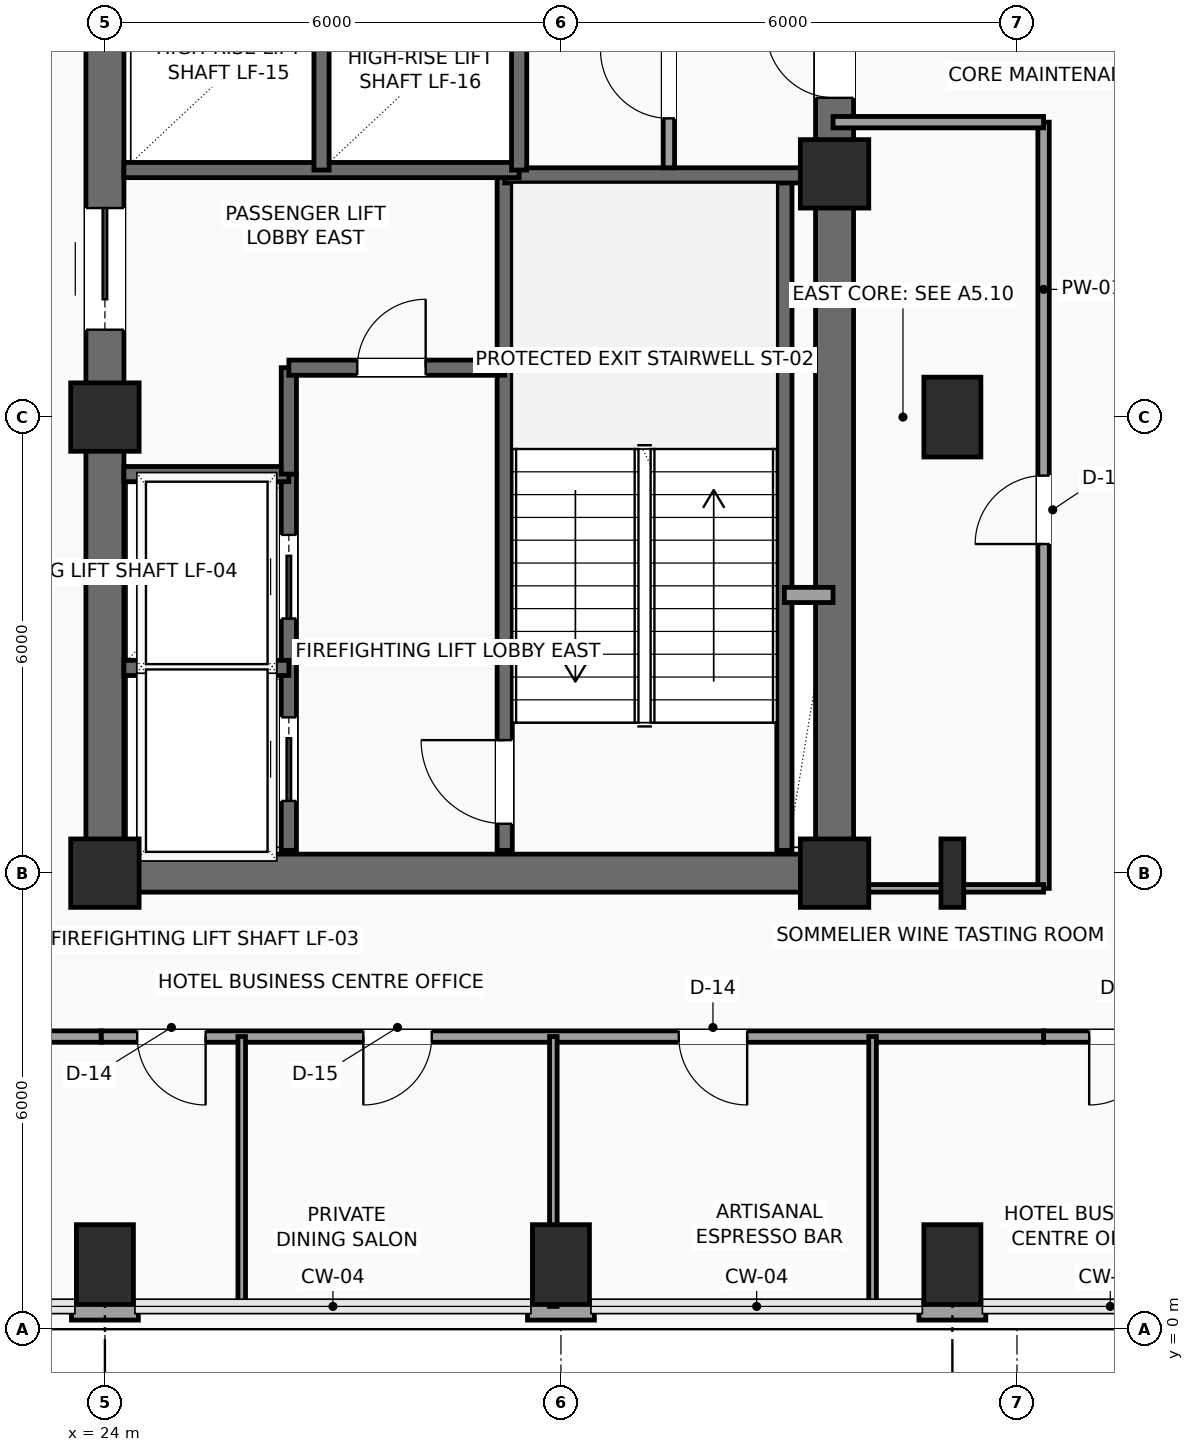
"""IFC4 building model, lengths in metres.
Left out: names, types, materials, properties, quantities, classifications, styles, units other than length and angle.
Written with IfcOpenShell. Run it as: python <this file> out.ifc"""

import sys

from ifc_helpers import new_model, si_unit, direction, frame, frame_2d, origin, origin_2d, place, context, subcontext, project, spatial, rectangle, i_section, extrude, element, fill, save


model = new_model("IFC4")
c1 = context("Model", 3, precision=1e-05, world=origin(), true_north=direction((0.0, 1.0)))
c2 = subcontext(c1, "Body", "Model", "MODEL_VIEW")
j1 = project(units=[si_unit("LENGTHUNIT", "METRE"), si_unit("PLANEANGLEUNIT", "RADIAN")], contexts=[c1])
p1 = place(None, origin())
s1 = spatial("IfcSite", under=j1, at=p1, CompositionType="ELEMENT")
p2 = place(p1, origin())
s2 = spatial("IfcBuilding", under=s1, at=p2, CompositionType="ELEMENT")
p3 = place(p2, frame((0.0, 0.0, 191.7)))
s3 = spatial("IfcBuildingStorey", under=s2, at=p3, CompositionType="ELEMENT", Elevation=191.7)
for number, where, z_axis, x_axis in (
    (1, (24.0, 6.0, 0.0), (0.0, 0.0, 1.0), (1.0, 0.0, 0.0)),
    (2, (24.0, 12.0, 0.0), (0.0, 0.0, 1.0), (1.0, 0.0, 0.0)),
    (3, (33.6, 6.0, 0.0), (0.0, 0.0, 1.0), (1.0, 0.0, 0.0)),
    (4, (33.6, 15.2, 0.0), (0.0, 0.0, 1.0), (1.0, 0.0, 0.0)),
):
    element("IfcColumn", number, at=place(p3, frame(where, z_axis=z_axis, x_axis=x_axis)), inside=s3, PredefinedType="COLUMN", context=c2, shape_type="SweptSolid", body=[
        extrude(rectangle(XDim=0.9, YDim=0.9, at=origin_2d()), origin(), (0.0, 0.0, 1.0), 3.75),
    ])
for number, where, z_axis, x_axis in (
    (5, (24.0, 0.85, 0.0), (0.0, 0.0, 1.0), (1.0, 0.0, 0.0)),
    (6, (30.0, 0.85, 0.0), (0.0, 0.0, 1.0), (1.0, 0.0, 0.0)),
    (7, (35.15, 0.85, 0.0), (0.0, 0.0, 1.0), (1.0, 0.0, 0.0)),
):
    element("IfcColumn", number, at=place(p3, frame(where, z_axis=z_axis, x_axis=x_axis)), inside=s3, PredefinedType="COLUMN", context=c2, shape_type="SweptSolid", body=[
        extrude(rectangle(XDim=0.75, YDim=1.05, at=origin_2d()), origin(), (0.0, 0.0, 1.0), 3.75),
    ])
p4 = place(p3, frame((35.15, 6.0, 0.0), z_axis=(0.0, 0.0, 1.0), x_axis=(1.0, 0.0, 0.0)))
e8 = element("IfcColumn", 8, at=p4, inside=s3, PredefinedType="COLUMN", context=c2, shape_type="SweptSolid", body=[
    extrude(i_section(OverallWidth=0.3, OverallDepth=0.9, WebThickness=0.019, FlangeThickness=0.035, FilletRadius=0.03, at=origin_2d()), origin(), (0.0, 0.0, 1.0), 3.75),
])
p5 = place(p3, frame((35.15, 12.0, 0.0), z_axis=(0.0, 0.0, 1.0), x_axis=(1.0, 0.0, 0.0)))
e9 = element("IfcColumn", 9, at=p5, inside=s3, PredefinedType="COLUMN", context=c2, shape_type="SweptSolid", body=[
    extrude(rectangle(XDim=0.75, YDim=1.05, at=origin_2d()), origin(), (0.0, 0.0, 1.0), 3.75),
])
p6 = place(p3, frame((35.59, 0.24, 0.0), z_axis=(0.0, 0.0, 1.0), x_axis=(-1.0, 0.0, 0.0)))
e10 = element("IfcWall", 10, at=p6, inside=s3, PredefinedType="SOLIDWALL", context=c2, shape_type="SweptSolid", body=[
    extrude(rectangle(XDim=0.88, YDim=0.24, at=frame_2d((0.44, 0.0))), origin(), (0.0, 0.0, 1.0), 3.54),
])
for number, where, z_axis, x_axis in (
    (11, (30.44, 0.24, 0.0), (0.0, 0.0, 1.0), (-1.0, 0.0, 0.0)),
    (12, (24.44, 0.24, 0.0), (0.0, 0.0, 1.0), (-1.0, 0.0, 0.0)),
):
    element("IfcWall", number, at=place(p3, frame(where, z_axis=z_axis, x_axis=x_axis)), inside=s3, PredefinedType="SOLIDWALL", context=c2, shape_type="SweptSolid", body=[
        extrude(rectangle(XDim=0.88, YDim=0.24, at=frame_2d((0.44, 0.0))), origin(), (0.0, 0.0, 1.0), 3.54),
    ])
p7 = place(p3, frame((24.0, 6.0, 0.0), z_axis=(0.0, 0.0, 1.0), x_axis=(1.0, 0.0, 0.0)))
e13 = element("IfcWall", 13, at=p7, inside=s3, PredefinedType="SHEAR", context=c2, shape_type="SweptSolid", body=[
    extrude(rectangle(XDim=9.6, YDim=0.5, at=frame_2d((4.8, 0.0))), origin(), (0.0, 0.0, 1.0), 3.54),
])
p8 = place(p3, frame((24.0, 6.0, 0.0), z_axis=(0.0, 0.0, 1.0), x_axis=(0.0, 1.0, 0.0)))
e14 = element("IfcWall", 14, at=p8, inside=s3, PredefinedType="SHEAR", context=c2, shape_type="SweptSolid", body=[
    extrude(rectangle(XDim=12.0, YDim=0.5, at=frame_2d((6.0, 0.0))), origin(), (0.0, 0.0, 1.0), 3.54),
])
p9 = place(p8, frame((7.15, 0.0, 0.0)))
e15 = element("IfcOpeningElement", 15, at=p9, cuts=e14, PredefinedType="OPENING", context=c2, shape_type="SweptSolid", body=[
    extrude(rectangle(XDim=1.6, YDim=2.3, at=frame_2d((0.8, 1.15))), frame((0.0, 0.26, 0.0), z_axis=(0.0, -1.0, 0.0), x_axis=(1.0, 0.0, 0.0)), (0.0, 0.0, 1.0), 0.52),
])
p10 = place(p3, frame((33.6, 6.0, 0.0), z_axis=(0.0, 0.0, 1.0), x_axis=(0.0, 1.0, 0.0)))
e16 = element("IfcWall", 16, at=p10, inside=s3, PredefinedType="SHEAR", context=c2, shape_type="SweptSolid", body=[
    extrude(rectangle(XDim=12.0, YDim=0.5, at=frame_2d((6.0, 0.0))), origin(), (0.0, 0.0, 1.0), 3.54),
])
p11 = place(p10, frame((10.2, 0.0, 0.0)))
e17 = element("IfcOpeningElement", 17, at=p11, cuts=e16, PredefinedType="OPENING", context=c2, shape_type="SweptSolid", body=[
    extrude(rectangle(XDim=0.9, YDim=2.15, at=frame_2d((0.45, 1.075))), frame((0.0, 0.26, 0.0), z_axis=(0.0, -1.0, 0.0), x_axis=(1.0, 0.0, 0.0)), (0.0, 0.0, 1.0), 0.52),
])
p12 = place(p3, frame((29.26, 6.3, 0.0), z_axis=(0.0, 0.0, 1.0), x_axis=(0.0, 1.0, 0.0)))
e18 = element("IfcWall", 18, at=p12, inside=s3, PredefinedType="SHEAR", context=c2, shape_type="SweptSolid", body=[
    extrude(rectangle(XDim=8.88, YDim=0.2, at=frame_2d((4.44, 0.0))), origin(), (0.0, 0.0, 1.0), 3.54),
])
p13 = place(p12, frame((0.35, 0.0, 0.0)))
e19 = element("IfcOpeningElement", 19, at=p13, cuts=e18, PredefinedType="OPENING", context=c2, shape_type="SweptSolid", body=[
    extrude(rectangle(XDim=1.1, YDim=2.2, at=frame_2d((0.55, 1.1))), frame((0.0, 0.11, 0.0), z_axis=(0.0, -1.0, 0.0), x_axis=(1.0, 0.0, 0.0)), (0.0, 0.0, 1.0), 0.22),
])
p14 = place(p3, frame((32.94, 6.3, 0.0), z_axis=(0.0, 0.0, 1.0), x_axis=(0.0, 1.0, 0.0)))
e20 = element("IfcWall", 20, at=p14, inside=s3, PredefinedType="SHEAR", context=c2, shape_type="SweptSolid", body=[
    extrude(rectangle(XDim=8.88, YDim=0.2, at=frame_2d((4.44, 0.0))), origin(), (0.0, 0.0, 1.0), 3.54),
])
p15 = place(p3, frame((29.26, 15.18, 0.0), z_axis=(0.0, 0.0, 1.0), x_axis=(1.0, 0.0, 0.0)))
e21 = element("IfcWall", 21, at=p15, inside=s3, PredefinedType="SHEAR", context=c2, shape_type="SweptSolid", body=[
    extrude(rectangle(XDim=4.04, YDim=0.2, at=frame_2d((2.02, 0.0))), origin(), (0.0, 0.0, 1.0), 3.54),
])
p16 = place(p3, frame((26.42, 6.3, 0.0), z_axis=(0.0, 0.0, 1.0), x_axis=(0.0, 1.0, 0.0)))
e22 = element("IfcWall", 22, at=p16, inside=s3, PredefinedType="SHEAR", context=c2, shape_type="SweptSolid", body=[
    extrude(rectangle(XDim=4.95, YDim=0.2, at=frame_2d((2.475, 0.0))), origin(), (0.0, 0.0, 1.0), 3.54),
])
p17 = place(p16, frame((0.65, 0.0, 0.0)))
e23 = element("IfcOpeningElement", 23, at=p17, cuts=e22, PredefinedType="OPENING", context=c2, shape_type="SweptSolid", body=[
    extrude(rectangle(XDim=1.1, YDim=2.2, at=frame_2d((0.55, 1.1))), frame((0.0, 0.11, 0.0), z_axis=(0.0, -1.0, 0.0), x_axis=(1.0, 0.0, 0.0)), (0.0, 0.0, 1.0), 0.22),
])
p18 = place(p16, frame((3.05, 0.0, 0.0)))
e24 = element("IfcOpeningElement", 24, at=p18, cuts=e22, PredefinedType="OPENING", context=c2, shape_type="SweptSolid", body=[
    extrude(rectangle(XDim=1.1, YDim=2.2, at=frame_2d((0.55, 1.1))), frame((0.0, 0.11, 0.0), z_axis=(0.0, -1.0, 0.0), x_axis=(1.0, 0.0, 0.0)), (0.0, 0.0, 1.0), 0.22),
])
for number, where, z_axis, x_axis in (
    (25, (24.25, 8.7, 0.0), (0.0, 0.0, 1.0), (1.0, 0.0, 0.0)),
    (26, (24.25, 11.25, 0.0), (0.0, 0.0, 1.0), (1.0, 0.0, 0.0)),
):
    element("IfcWall", number, at=place(p3, frame(where, z_axis=z_axis, x_axis=x_axis)), inside=s3, PredefinedType="SHEAR", context=c2, shape_type="SweptSolid", body=[
        extrude(rectangle(XDim=2.17, YDim=0.2, at=frame_2d((1.085, 0.0))), origin(), (0.0, 0.0, 1.0), 3.54),
    ])
p19 = place(p3, frame((26.42, 11.25, 0.0), z_axis=(0.0, 0.0, 1.0), x_axis=(0.0, 1.0, 0.0)))
e27 = element("IfcWall", 27, at=p19, inside=s3, PredefinedType="SHEAR", context=c2, shape_type="SweptSolid", body=[
    extrude(rectangle(XDim=1.4, YDim=0.2, at=frame_2d((0.7, 0.0))), origin(), (0.0, 0.0, 1.0), 3.54),
])
p20 = place(p3, frame((26.42, 12.65, 0.0), z_axis=(0.0, 0.0, 1.0), x_axis=(1.0, 0.0, 0.0)))
e28 = element("IfcWall", 28, at=p20, inside=s3, PredefinedType="SHEAR", context=c2, shape_type="SweptSolid", body=[
    extrude(rectangle(XDim=2.84, YDim=0.2, at=frame_2d((1.42, 0.0))), origin(), (0.0, 0.0, 1.0), 3.54),
])
p21 = place(p20, frame((0.9, 0.0, 0.0)))
e29 = element("IfcOpeningElement", 29, at=p21, cuts=e28, PredefinedType="OPENING", context=c2, shape_type="SweptSolid", body=[
    extrude(rectangle(XDim=0.9, YDim=2.15, at=frame_2d((0.45, 1.075))), frame((0.0, 0.11, 0.0), z_axis=(0.0, -1.0, 0.0), x_axis=(1.0, 0.0, 0.0)), (0.0, 0.0, 1.0), 0.22),
])
p22 = place(p3, frame((32.94, 9.66, 0.0), z_axis=(0.0, 0.0, 1.0), x_axis=(1.0, 0.0, 0.0)))
e30 = element("IfcWall", 30, at=p22, inside=s3, PredefinedType="SOLIDWALL", context=c2, shape_type="SweptSolid", body=[
    extrude(rectangle(XDim=0.64, YDim=0.2, at=frame_2d((0.32, 0.0))), origin(), (0.0, 0.0, 1.0), 3.54),
])
p23 = place(p3, frame((24.25, 15.25, 0.0), z_axis=(0.0, 0.0, 1.0), x_axis=(1.0, 0.0, 0.0)))
e31 = element("IfcWall", 31, at=p23, inside=s3, PredefinedType="SHEAR", context=c2, shape_type="SweptSolid", body=[
    extrude(rectangle(XDim=5.2, YDim=0.2, at=frame_2d((2.6, 0.0))), origin(), (0.0, 0.0, 1.0), 3.54),
])
p24 = place(p3, frame((26.85, 15.25, 0.0), z_axis=(0.0, 0.0, 1.0), x_axis=(0.0, 1.0, 0.0)))
e32 = element("IfcWall", 32, at=p24, inside=s3, PredefinedType="SHEAR", context=c2, shape_type="SweptSolid", body=[
    extrude(rectangle(XDim=2.4, YDim=0.2, at=frame_2d((1.2, 0.0))), origin(), (0.0, 0.0, 1.0), 3.54),
])
p25 = place(p3, frame((29.45, 15.25, 0.0), z_axis=(0.0, 0.0, 1.0), x_axis=(0.0, 1.0, 0.0)))
e33 = element("IfcWall", 33, at=p25, inside=s3, PredefinedType="SHEAR", context=c2, shape_type="SweptSolid", body=[
    extrude(rectangle(XDim=2.45, YDim=0.2, at=frame_2d((1.225, 0.0))), origin(), (0.0, 0.0, 1.0), 3.54),
])
p26 = place(p3, frame((31.42, 15.28, 0.0), z_axis=(0.0, 0.0, 1.0), x_axis=(0.0, 1.0, 0.0)))
e34 = element("IfcWall", 34, at=p26, inside=s3, PredefinedType="PARTITIONING", context=c2, shape_type="SweptSolid", body=[
    extrude(rectangle(XDim=2.42, YDim=0.15, at=frame_2d((1.21, 0.0))), origin(), (0.0, 0.0, 1.0), 3.54),
])
p27 = place(p26, frame((0.65, 0.0, 0.0)))
e35 = element("IfcOpeningElement", 35, at=p27, cuts=e34, PredefinedType="OPENING", context=c2, shape_type="SweptSolid", body=[
    extrude(rectangle(XDim=0.9, YDim=2.15, at=frame_2d((0.45, 1.075))), frame((0.0, 0.085, 0.0), z_axis=(0.0, -1.0, 0.0), x_axis=(1.0, 0.0, 0.0)), (0.0, 0.0, 1.0), 0.17),
])
p28 = place(p3, frame((36.35, 5.8, 0.0), z_axis=(0.0, 0.0, 1.0), x_axis=(0.0, 1.0, 0.0)))
e36 = element("IfcWall", 36, at=p28, inside=s3, PredefinedType="PARTITIONING", context=c2, shape_type="SweptSolid", body=[
    extrude(rectangle(XDim=10.08, YDim=0.15, at=frame_2d((5.04, 0.0))), origin(), (0.0, 0.0, 1.0), 3.54),
])
p29 = place(p28, frame((4.53, 0.0, 0.0)))
e37 = element("IfcOpeningElement", 37, at=p29, cuts=e36, PredefinedType="OPENING", context=c2, shape_type="SweptSolid", body=[
    extrude(rectangle(XDim=0.9, YDim=2.1, at=frame_2d((0.45, 1.05))), frame((0.0, 0.085, 0.0), z_axis=(0.0, -1.0, 0.0), x_axis=(1.0, 0.0, 0.0)), (0.0, 0.0, 1.0), 0.17),
])
p30 = place(p3, frame((36.35, 15.88, 0.0), z_axis=(0.0, 0.0, 1.0), x_axis=(-1.0, 0.0, 0.0)))
e38 = element("IfcWall", 38, at=p30, inside=s3, PredefinedType="PARTITIONING", context=c2, shape_type="SweptSolid", body=[
    extrude(rectangle(XDim=2.77, YDim=0.15, at=frame_2d((1.385, 0.0))), origin(), (0.0, 0.0, 1.0), 3.54),
])
p31 = place(p3, frame((38.45, 3.85, 0.0), z_axis=(0.0, 0.0, 1.0), x_axis=(-1.0, 0.0, 0.0)))
e39 = element("IfcWall", 39, at=p31, inside=s3, PredefinedType="PARTITIONING", context=c2, shape_type="SweptSolid", body=[
    extrude(rectangle(XDim=2.1, YDim=0.15, at=frame_2d((1.05, 0.0))), origin(), (0.0, 0.0, 1.0), 3.54),
])
p32 = place(p31, frame((0.6, 0.0, 0.0)))
e40 = element("IfcOpeningElement", 40, at=p32, cuts=e39, PredefinedType="OPENING", context=c2, shape_type="SweptSolid", body=[
    extrude(rectangle(XDim=0.9, YDim=2.1, at=frame_2d((0.45, 1.05))), frame((0.0, 0.085, 0.0), z_axis=(0.0, -1.0, 0.0), x_axis=(1.0, 0.0, 0.0)), (0.0, 0.0, 1.0), 0.17),
])
p33 = place(p3, frame((36.35, 3.85, 0.0), z_axis=(0.0, 0.0, 1.0), x_axis=(-1.0, 0.0, 0.0)))
e41 = element("IfcWall", 41, at=p33, inside=s3, PredefinedType="PARTITIONING", context=c2, shape_type="SweptSolid", body=[
    extrude(rectangle(XDim=12.4, YDim=0.15, at=frame_2d((6.2, 0.0))), origin(), (0.0, 0.0, 1.0), 3.54),
])
p34 = place(p33, frame((11.025, 0.0, 0.0)))
e42 = element("IfcOpeningElement", 42, at=p34, cuts=e41, PredefinedType="OPENING", context=c2, shape_type="SweptSolid", body=[
    extrude(rectangle(XDim=0.9, YDim=2.1, at=frame_2d((0.45, 1.05))), frame((0.0, 0.085, 0.0), z_axis=(0.0, -1.0, 0.0), x_axis=(1.0, 0.0, 0.0)), (0.0, 0.0, 1.0), 0.17),
])
p35 = place(p33, frame((8.05, 0.0, 0.0)))
e43 = element("IfcOpeningElement", 43, at=p35, cuts=e41, PredefinedType="OPENING", context=c2, shape_type="SweptSolid", body=[
    extrude(rectangle(XDim=0.9, YDim=2.1, at=frame_2d((0.45, 1.05))), frame((0.0, 0.085, 0.0), z_axis=(0.0, -1.0, 0.0), x_axis=(1.0, 0.0, 0.0)), (0.0, 0.0, 1.0), 0.17),
])
p36 = place(p33, frame((3.9, 0.0, 0.0)))
e44 = element("IfcOpeningElement", 44, at=p36, cuts=e41, PredefinedType="OPENING", context=c2, shape_type="SweptSolid", body=[
    extrude(rectangle(XDim=0.9, YDim=2.1, at=frame_2d((0.45, 1.05))), frame((0.0, 0.085, 0.0), z_axis=(0.0, -1.0, 0.0), x_axis=(1.0, 0.0, 0.0)), (0.0, 0.0, 1.0), 0.17),
])
p37 = place(p3, frame((23.95, 3.85, 0.0), z_axis=(0.0, 0.0, 1.0), x_axis=(-1.0, 0.0, 0.0)))
e45 = element("IfcWall", 45, at=p37, inside=s3, PredefinedType="PARTITIONING", context=c2, shape_type="SweptSolid", body=[
    extrude(rectangle(XDim=2.0, YDim=0.15, at=frame_2d((1.0, 0.0))), origin(), (0.0, 0.0, 1.0), 3.54),
])
for number, where, z_axis, x_axis in (
    (46, (25.8, 0.3, 0.0), (0.0, 0.0, 1.0), (0.0, 1.0, 0.0)),
    (47, (29.9, 0.3, 0.0), (0.0, 0.0, 1.0), (0.0, 1.0, 0.0)),
    (48, (34.1, 0.3, 0.0), (0.0, 0.0, 1.0), (0.0, 1.0, 0.0)),
):
    element("IfcWall", number, at=place(p3, frame(where, z_axis=z_axis, x_axis=x_axis)), inside=s3, PredefinedType="PARTITIONING", context=c2, shape_type="SweptSolid", body=[
        extrude(rectangle(XDim=3.55, YDim=0.1, at=frame_2d((1.775, 0.0))), origin(), (0.0, 0.0, 1.0), 3.54),
    ])
p38 = place(p3, frame((33.65, 5.8, 0.0), z_axis=(0.0, 0.0, 1.0), x_axis=(1.0, 0.0, 0.0)))
e49 = element("IfcWall", 49, at=p38, inside=s3, PredefinedType="PARTITIONING", context=c2, shape_type="SweptSolid", body=[
    extrude(rectangle(XDim=2.7, YDim=0.1, at=frame_2d((1.35, 0.0))), origin(), (0.0, 0.0, 1.0), 3.132),
])
p39 = place(p9, origin())
e50 = element("IfcDoor", 50, at=p39, inside=s3, OperationType="DOUBLE_DOOR_SLIDING", PredefinedType="DOOR", context=c2, shape_type="SweptSolid", body=[
    extrude(rectangle(XDim=1.6, YDim=2.3, at=frame_2d((0.8, 1.15))), frame((0.0, 0.025, 0.0), z_axis=(0.0, -1.0, 0.0), x_axis=(1.0, 0.0, 0.0)), (0.0, 0.0, 1.0), 0.05),
])
fill(e15, e50)
p40 = place(p11, origin())
e51 = element("IfcDoor", 51, at=p40, inside=s3, OperationType="SINGLE_SWING_RIGHT", PredefinedType="DOOR", context=c2, shape_type="SweptSolid", body=[
    extrude(rectangle(XDim=0.9, YDim=2.15, at=frame_2d((0.45, 1.075))), frame((0.0, 0.025, 0.0), z_axis=(0.0, -1.0, 0.0), x_axis=(1.0, 0.0, 0.0)), (0.0, 0.0, 1.0), 0.05),
])
fill(e17, e51)
p41 = place(p13, origin())
e52 = element("IfcDoor", 52, at=p41, inside=s3, OperationType="SINGLE_SWING_RIGHT", PredefinedType="DOOR", context=c2, shape_type="SweptSolid", body=[
    extrude(rectangle(XDim=1.1, YDim=2.2, at=frame_2d((0.55, 1.1))), frame((0.0, 0.025, 0.0), z_axis=(0.0, -1.0, 0.0), x_axis=(1.0, 0.0, 0.0)), (0.0, 0.0, 1.0), 0.05),
])
fill(e19, e52)
p42 = place(p17, origin())
e53 = element("IfcDoor", 53, at=p42, inside=s3, OperationType="SLIDING_TO_LEFT", PredefinedType="DOOR", context=c2, shape_type="SweptSolid", body=[
    extrude(rectangle(XDim=1.1, YDim=2.2, at=frame_2d((0.55, 1.1))), frame((0.0, 0.025, 0.0), z_axis=(0.0, -1.0, 0.0), x_axis=(1.0, 0.0, 0.0)), (0.0, 0.0, 1.0), 0.05),
])
fill(e23, e53)
p43 = place(p18, origin())
e54 = element("IfcDoor", 54, at=p43, inside=s3, OperationType="SLIDING_TO_LEFT", PredefinedType="DOOR", context=c2, shape_type="SweptSolid", body=[
    extrude(rectangle(XDim=1.1, YDim=2.2, at=frame_2d((0.55, 1.1))), frame((0.0, 0.025, 0.0), z_axis=(0.0, -1.0, 0.0), x_axis=(1.0, 0.0, 0.0)), (0.0, 0.0, 1.0), 0.05),
])
fill(e24, e54)
p44 = place(p21, origin())
e55 = element("IfcDoor", 55, at=p44, inside=s3, OperationType="SINGLE_SWING_RIGHT", PredefinedType="DOOR", context=c2, shape_type="SweptSolid", body=[
    extrude(rectangle(XDim=0.9, YDim=2.15, at=frame_2d((0.45, 1.075))), frame((0.0, 0.025, 0.0), z_axis=(0.0, -1.0, 0.0), x_axis=(1.0, 0.0, 0.0)), (0.0, 0.0, 1.0), 0.05),
])
fill(e29, e55)
p45 = place(p27, origin())
e56 = element("IfcDoor", 56, at=p45, inside=s3, OperationType="SINGLE_SWING_RIGHT", PredefinedType="DOOR", context=c2, shape_type="SweptSolid", body=[
    extrude(rectangle(XDim=0.9, YDim=2.15, at=frame_2d((0.45, 1.075))), frame((0.0, 0.025, 0.0), z_axis=(0.0, -1.0, 0.0), x_axis=(1.0, 0.0, 0.0)), (0.0, 0.0, 1.0), 0.05),
])
fill(e35, e56)
p46 = place(p29, origin())
e57 = element("IfcDoor", 57, at=p46, inside=s3, OperationType="SINGLE_SWING_LEFT", PredefinedType="DOOR", context=c2, shape_type="SweptSolid", body=[
    extrude(rectangle(XDim=0.9, YDim=2.1, at=frame_2d((0.45, 1.05))), frame((0.0, 0.025, 0.0), z_axis=(0.0, -1.0, 0.0), x_axis=(1.0, 0.0, 0.0)), (0.0, 0.0, 1.0), 0.05),
])
fill(e37, e57)
p47 = place(p32, origin())
e58 = element("IfcDoor", 58, at=p47, inside=s3, OperationType="SINGLE_SWING_RIGHT", PredefinedType="DOOR", context=c2, shape_type="SweptSolid", body=[
    extrude(rectangle(XDim=0.9, YDim=2.1, at=frame_2d((0.45, 1.05))), frame((0.0, 0.025, 0.0), z_axis=(0.0, -1.0, 0.0), x_axis=(1.0, 0.0, 0.0)), (0.0, 0.0, 1.0), 0.05),
])
fill(e40, e58)
p48 = place(p34, origin())
e59 = element("IfcDoor", 59, at=p48, inside=s3, OperationType="SINGLE_SWING_LEFT", PredefinedType="DOOR", context=c2, shape_type="SweptSolid", body=[
    extrude(rectangle(XDim=0.9, YDim=2.1, at=frame_2d((0.45, 1.05))), frame((0.0, 0.025, 0.0), z_axis=(0.0, -1.0, 0.0), x_axis=(1.0, 0.0, 0.0)), (0.0, 0.0, 1.0), 0.05),
])
fill(e42, e59)
p49 = place(p35, origin())
e60 = element("IfcDoor", 60, at=p49, inside=s3, OperationType="SINGLE_SWING_RIGHT", PredefinedType="DOOR", context=c2, shape_type="SweptSolid", body=[
    extrude(rectangle(XDim=0.9, YDim=2.1, at=frame_2d((0.45, 1.05))), frame((0.0, 0.025, 0.0), z_axis=(0.0, -1.0, 0.0), x_axis=(1.0, 0.0, 0.0)), (0.0, 0.0, 1.0), 0.05),
])
fill(e43, e60)
p50 = place(p36, origin())
e61 = element("IfcDoor", 61, at=p50, inside=s3, OperationType="SINGLE_SWING_LEFT", PredefinedType="DOOR", context=c2, shape_type="SweptSolid", body=[
    extrude(rectangle(XDim=0.9, YDim=2.1, at=frame_2d((0.45, 1.05))), frame((0.0, 0.025, 0.0), z_axis=(0.0, -1.0, 0.0), x_axis=(1.0, 0.0, 0.0)), (0.0, 0.0, 1.0), 0.05),
])
fill(e44, e61)
save(model, sys.argv[1])
